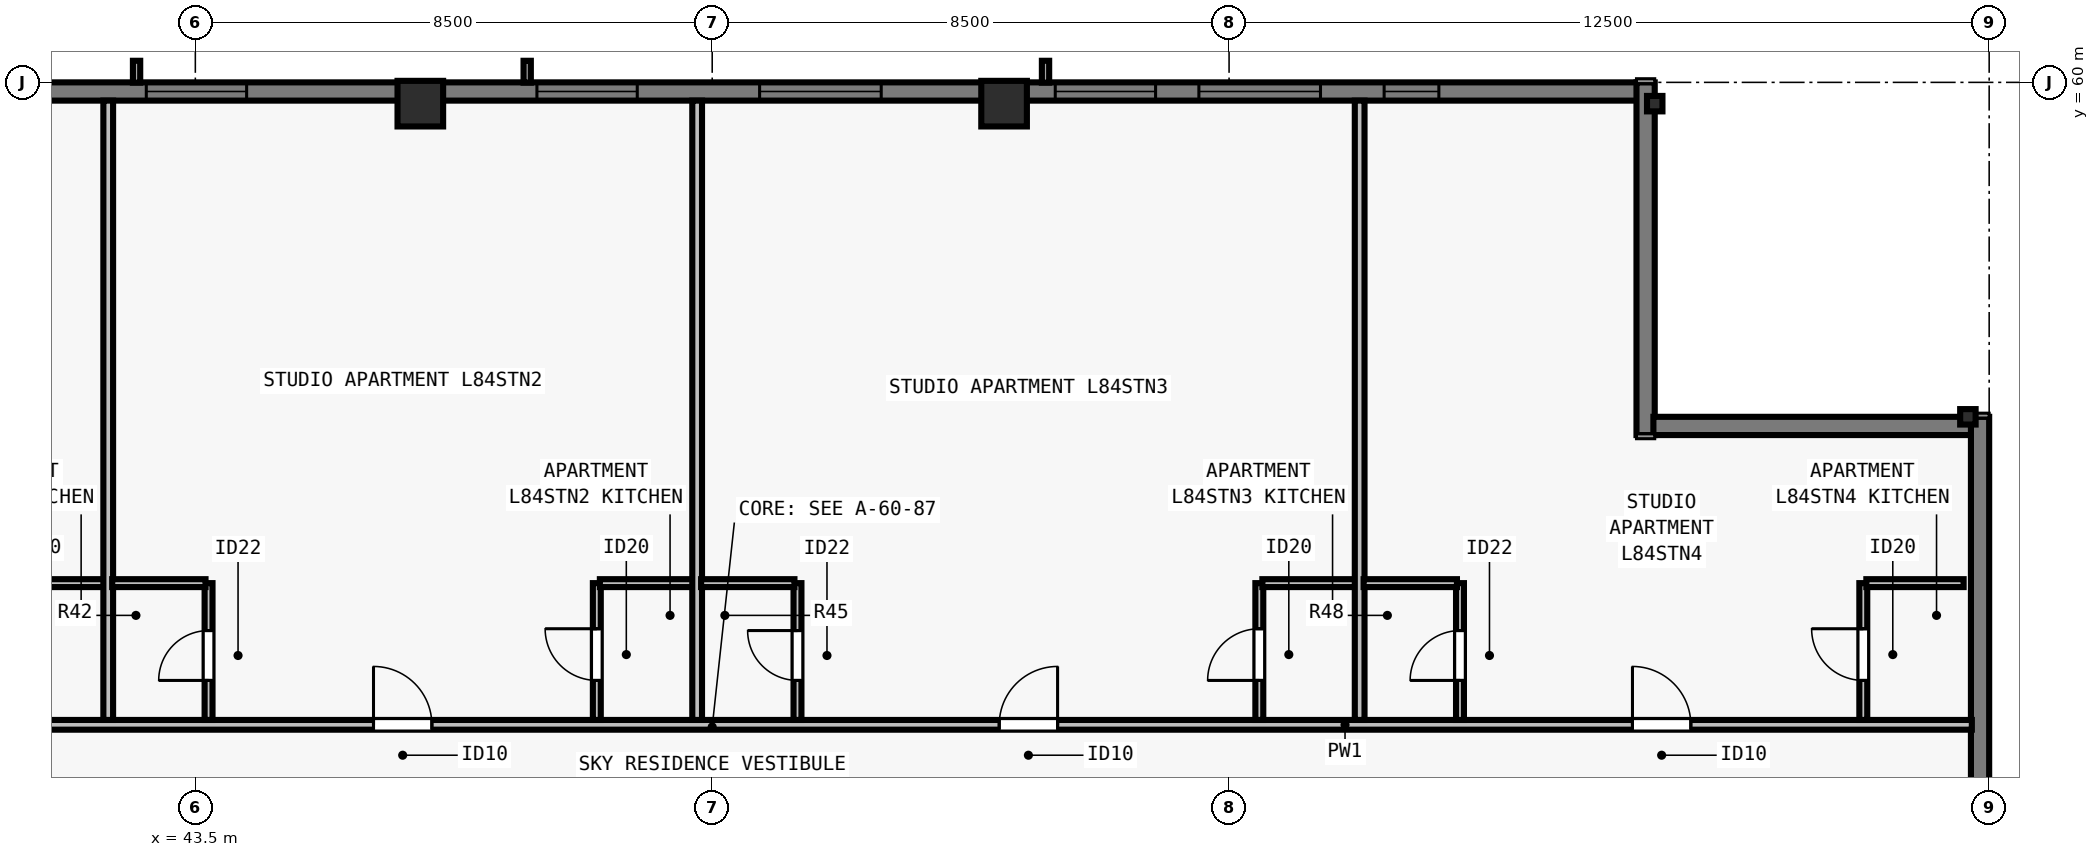
"""IFC4 building model, lengths in metres.
Left out: names, types, materials, properties, quantities, classifications, styles, units other than length and angle.
Written with IfcOpenShell. Run it as: python <this file> out.ifc"""

import sys

from ifc_helpers import new_model, si_unit, direction, frame, frame_2d, origin, origin_2d, place, context, subcontext, project, spatial, rectangle, i_section, extrude, element, fill, save


model = new_model("IFC4")
c1 = context("Model", 3, precision=1e-05, world=origin(), true_north=direction((0.0, 1.0)))
c2 = subcontext(c1, "Body", "Model", "MODEL_VIEW")
j1 = project(units=[si_unit("LENGTHUNIT", "METRE"), si_unit("PLANEANGLEUNIT", "RADIAN")], contexts=[c1])
p1 = place(None, origin())
s1 = spatial("IfcSite", under=j1, at=p1, CompositionType="ELEMENT")
p2 = place(p1, origin())
s2 = spatial("IfcBuilding", under=s1, at=p2, CompositionType="ELEMENT")
p3 = place(p2, frame((0.0, 0.0, 305.0)))
s3 = spatial("IfcBuildingStorey", under=s2, at=p3, CompositionType="ELEMENT", Elevation=305.0)
for number, where, z_axis, x_axis in (
    (1, (72.65, 54.5, 0.0), (0.0, 0.0, 1.0), (0.0, 1.0, 0.0)),
    (2, (67.5, 59.65, 0.0), (0.0, 0.0, 1.0), (1.0, 0.0, 0.0)),
):
    element("IfcColumn", number, at=place(p3, frame(where, z_axis=z_axis, x_axis=x_axis)), inside=s3, PredefinedType="COLUMN", context=c2, shape_type="SweptSolid", body=[
        extrude(i_section(OverallWidth=0.254, OverallDepth=0.254, WebThickness=0.009, FlangeThickness=0.014, FilletRadius=0.013, at=origin_2d()), origin(), (0.0, 0.0, 1.0), 3.5),
    ])
for number, where, z_axis, x_axis in (
    (3, (56.8, 59.65, 0.0), (0.0, 0.0, 1.0), (1.0, 0.0, 0.0)),
    (4, (47.2, 59.65, 0.0), (0.0, 0.0, 1.0), (1.0, 0.0, 0.0)),
):
    element("IfcColumn", number, at=place(p3, frame(where, z_axis=z_axis, x_axis=x_axis)), inside=s3, PredefinedType="COLUMN", context=c2, shape_type="SweptSolid", body=[
        extrude(rectangle(XDim=0.75, YDim=0.75, at=origin_2d()), origin(), (0.0, 0.0, 1.0), 3.5),
    ])
p4 = place(p3, frame((36.5, 59.85, 0.0), z_axis=(0.0, 0.0, 1.0), x_axis=(1.0, 0.0, 0.0)))
e5 = element("IfcWall", 5, at=p4, inside=s3, PredefinedType="SOLIDWALL", context=c2, shape_type="SweptSolid", body=[
    extrude(rectangle(XDim=30.722, YDim=0.3, at=frame_2d((15.361, 0.0))), origin(), (0.0, 0.0, 1.0), 3.29),
])
p5 = place(p4, frame((6.194, 0.0, 0.8)))
e6 = element("IfcOpeningElement", 6, at=p5, cuts=e5, PredefinedType="OPENING", context=c2, shape_type="SweptSolid", body=[
    extrude(rectangle(XDim=1.65, YDim=1.758, at=frame_2d((0.825, 0.879))), frame((0.0, 0.16, 0.0), z_axis=(0.0, -1.0, 0.0), x_axis=(1.0, 0.0, 0.0)), (0.0, 0.0, 1.0), 0.32),
])
p6 = place(p4, frame((12.617, 0.0, 0.8)))
e7 = element("IfcOpeningElement", 7, at=p6, cuts=e5, PredefinedType="OPENING", context=c2, shape_type="SweptSolid", body=[
    extrude(rectangle(XDim=1.65, YDim=1.758, at=frame_2d((0.825, 0.879))), frame((0.0, 0.16, 0.0), z_axis=(0.0, -1.0, 0.0), x_axis=(1.0, 0.0, 0.0)), (0.0, 0.0, 1.0), 0.32),
])
p7 = place(p4, frame((16.28, 0.0, 0.8)))
e8 = element("IfcOpeningElement", 8, at=p7, cuts=e5, PredefinedType="OPENING", context=c2, shape_type="SweptSolid", body=[
    extrude(rectangle(XDim=2.0, YDim=1.758, at=frame_2d((1.0, 0.879))), frame((0.0, 0.16, 0.0), z_axis=(0.0, -1.0, 0.0), x_axis=(1.0, 0.0, 0.0)), (0.0, 0.0, 1.0), 0.32),
])
p8 = place(p4, frame((21.142, 0.0, 0.8)))
e9 = element("IfcOpeningElement", 9, at=p8, cuts=e5, PredefinedType="OPENING", context=c2, shape_type="SweptSolid", body=[
    extrude(rectangle(XDim=1.65, YDim=1.758, at=frame_2d((0.825, 0.879))), frame((0.0, 0.16, 0.0), z_axis=(0.0, -1.0, 0.0), x_axis=(1.0, 0.0, 0.0)), (0.0, 0.0, 1.0), 0.32),
])
p9 = place(p4, frame((23.503, 0.0, 0.8)))
e10 = element("IfcOpeningElement", 10, at=p9, cuts=e5, PredefinedType="OPENING", context=c2, shape_type="SweptSolid", body=[
    extrude(rectangle(XDim=2.0, YDim=1.758, at=frame_2d((1.0, 0.879))), frame((0.0, 0.16, 0.0), z_axis=(0.0, -1.0, 0.0), x_axis=(1.0, 0.0, 0.0)), (0.0, 0.0, 1.0), 0.32),
])
p10 = place(p4, frame((26.55, 0.0, 0.8)))
e11 = element("IfcOpeningElement", 11, at=p10, cuts=e5, PredefinedType="OPENING", context=c2, shape_type="SweptSolid", body=[
    extrude(rectangle(XDim=0.9, YDim=1.75, at=frame_2d((0.45, 0.875))), frame((0.0, 0.16, 0.0), z_axis=(0.0, -1.0, 0.0), x_axis=(1.0, 0.0, 0.0)), (0.0, 0.0, 1.0), 0.32),
])
p11 = place(p3, frame((67.35, 60.0, 0.0), z_axis=(0.0, 0.0, 1.0), x_axis=(0.0, -1.0, 0.0)))
e12 = element("IfcWall", 12, at=p11, inside=s3, PredefinedType="SOLIDWALL", context=c2, shape_type="SweptSolid", body=[
    extrude(rectangle(XDim=5.8, YDim=0.3, at=frame_2d((2.9, 0.0))), origin(), (0.0, 0.0, 1.0), 3.29),
])
p12 = place(p3, frame((67.478, 54.35, 0.0), z_axis=(0.0, 0.0, 1.0), x_axis=(1.0, 0.0, 0.0)))
e13 = element("IfcWall", 13, at=p12, inside=s3, PredefinedType="SOLIDWALL", context=c2, shape_type="SweptSolid", body=[
    extrude(rectangle(XDim=5.244, YDim=0.3, at=frame_2d((2.622, 0.0))), origin(), (0.0, 0.0, 1.0), 3.29),
])
p13 = place(p3, frame((72.85, 54.5, 0.0), z_axis=(0.0, 0.0, 1.0), x_axis=(0.0, -1.0, 0.0)))
e14 = element("IfcWall", 14, at=p13, inside=s3, PredefinedType="SOLIDWALL", context=c2, shape_type="SweptSolid", body=[
    extrude(rectangle(XDim=11.822, YDim=0.3, at=frame_2d((5.911, 0.0))), origin(), (0.0, 0.0, 1.0), 3.29),
])
p14 = place(p13, frame((7.892, 0.0, 0.8)))
e15 = element("IfcOpeningElement", 15, at=p14, cuts=e14, PredefinedType="OPENING", context=c2, shape_type="SweptSolid", body=[
    extrude(rectangle(XDim=2.0, YDim=1.758, at=frame_2d((1.0, 0.879))), frame((0.0, 0.16, 0.0), z_axis=(0.0, -1.0, 0.0), x_axis=(1.0, 0.0, 0.0)), (0.0, 0.0, 1.0), 0.32),
])
p15 = place(p3, frame((31.285, 49.435, 0.0), z_axis=(0.0, 0.0, 1.0), x_axis=(1.0, 0.0, 0.0)))
e16 = element("IfcWall", 16, at=p15, inside=s3, PredefinedType="PARTITIONING", context=c2, shape_type="SweptSolid", body=[
    extrude(rectangle(XDim=41.43, YDim=0.16, at=frame_2d((20.715, 0.0))), origin(), (0.0, 0.0, 1.0), 3.009),
])
p16 = place(p15, frame((4.979, 0.0, 0.0)))
e17 = element("IfcOpeningElement", 17, at=p16, cuts=e16, PredefinedType="OPENING", context=c2, shape_type="SweptSolid", body=[
    extrude(rectangle(XDim=0.96, YDim=2.18, at=frame_2d((0.48, 1.09))), frame((0.0, 0.09, 0.0), z_axis=(0.0, -1.0, 0.0), x_axis=(1.0, 0.0, 0.0)), (0.0, 0.0, 1.0), 0.18),
])
p17 = place(p15, frame((15.145, 0.0, 0.0)))
e18 = element("IfcOpeningElement", 18, at=p17, cuts=e16, PredefinedType="OPENING", context=c2, shape_type="SweptSolid", body=[
    extrude(rectangle(XDim=0.96, YDim=2.18, at=frame_2d((0.48, 1.09))), frame((0.0, 0.09, 0.0), z_axis=(0.0, -1.0, 0.0), x_axis=(1.0, 0.0, 0.0)), (0.0, 0.0, 1.0), 0.18),
])
p18 = place(p15, frame((25.435, 0.0, 0.0)))
e19 = element("IfcOpeningElement", 19, at=p18, cuts=e16, PredefinedType="OPENING", context=c2, shape_type="SweptSolid", body=[
    extrude(rectangle(XDim=0.96, YDim=2.18, at=frame_2d((0.48, 1.09))), frame((0.0, 0.09, 0.0), z_axis=(0.0, -1.0, 0.0), x_axis=(1.0, 0.0, 0.0)), (0.0, 0.0, 1.0), 0.18),
])
p19 = place(p15, frame((35.849, 0.0, 0.0)))
e20 = element("IfcOpeningElement", 20, at=p19, cuts=e16, PredefinedType="OPENING", context=c2, shape_type="SweptSolid", body=[
    extrude(rectangle(XDim=0.96, YDim=2.18, at=frame_2d((0.48, 1.09))), frame((0.0, 0.09, 0.0), z_axis=(0.0, -1.0, 0.0), x_axis=(1.0, 0.0, 0.0)), (0.0, 0.0, 1.0), 0.18),
])
p20 = place(p3, frame((40.468, 51.765, 0.0), z_axis=(0.0, 0.0, 1.0), x_axis=(1.0, 0.0, 0.0)))
e21 = element("IfcWall", 21, at=p20, inside=s3, PredefinedType="PLUMBINGWALL", context=c2, shape_type="SweptSolid", body=[
    extrude(rectangle(XDim=1.6, YDim=0.13, at=frame_2d((0.8, 0.0))), origin(), (0.0, 0.0, 1.0), 3.29),
])
p21 = place(p3, frame((42.067, 49.515, 0.0), z_axis=(0.0, 0.0, 1.0), x_axis=(0.0, 1.0, 0.0)))
e22 = element("IfcWall", 22, at=p21, inside=s3, PredefinedType="PARTITIONING", context=c2, shape_type="SweptSolid", body=[
    extrude(rectangle(XDim=10.185, YDim=0.16, at=frame_2d((5.093, 0.0))), origin(), (0.0, 0.0, 1.0), 2.653),
])
p22 = place(p3, frame((43.718, 49.515, 0.0), z_axis=(0.0, 0.0, 1.0), x_axis=(0.0, 1.0, 0.0)))
e23 = element("IfcWall", 23, at=p22, inside=s3, PredefinedType="PLUMBINGWALL", context=c2, shape_type="SweptSolid", body=[
    extrude(rectangle(XDim=2.25, YDim=0.13, at=frame_2d((1.125, 0.0))), origin(), (0.0, 0.0, 1.0), 3.29),
])
p23 = place(p22, frame((0.65, 0.0, 0.0)))
e24 = element("IfcOpeningElement", 24, at=p23, cuts=e23, PredefinedType="OPENING", context=c2, shape_type="SweptSolid", body=[
    extrude(rectangle(XDim=0.82, YDim=2.1, at=frame_2d((0.41, 1.05))), frame((0.0, 0.075, 0.0), z_axis=(0.0, -1.0, 0.0), x_axis=(1.0, 0.0, 0.0)), (0.0, 0.0, 1.0), 0.15),
])
p24 = place(p3, frame((42.133, 51.765, 0.0), z_axis=(0.0, 0.0, 1.0), x_axis=(1.0, 0.0, 0.0)))
e25 = element("IfcWall", 25, at=p24, inside=s3, PredefinedType="PLUMBINGWALL", context=c2, shape_type="SweptSolid", body=[
    extrude(rectangle(XDim=1.535, YDim=0.13, at=frame_2d((0.768, 0.0))), origin(), (0.0, 0.0, 1.0), 3.29),
])
p25 = place(p3, frame((50.103, 49.515, 0.0), z_axis=(0.0, 0.0, 1.0), x_axis=(0.0, 1.0, 0.0)))
e26 = element("IfcWall", 26, at=p25, inside=s3, PredefinedType="PLUMBINGWALL", context=c2, shape_type="SweptSolid", body=[
    extrude(rectangle(XDim=2.25, YDim=0.13, at=frame_2d((1.125, 0.0))), origin(), (0.0, 0.0, 1.0), 3.009),
])
p26 = place(p25, frame((0.65, 0.0, 0.0)))
e27 = element("IfcOpeningElement", 27, at=p26, cuts=e26, PredefinedType="OPENING", context=c2, shape_type="SweptSolid", body=[
    extrude(rectangle(XDim=0.85, YDim=2.1, at=frame_2d((0.425, 1.05))), frame((0.0, 0.075, 0.0), z_axis=(0.0, -1.0, 0.0), x_axis=(1.0, 0.0, 0.0)), (0.0, 0.0, 1.0), 0.15),
])
p27 = place(p3, frame((50.153, 51.765, 0.0), z_axis=(0.0, 0.0, 1.0), x_axis=(1.0, 0.0, 0.0)))
e28 = element("IfcWall", 28, at=p27, inside=s3, PredefinedType="PLUMBINGWALL", context=c2, shape_type="SweptSolid", body=[
    extrude(rectangle(XDim=1.6, YDim=0.13, at=frame_2d((0.8, 0.0))), origin(), (0.0, 0.0, 1.0), 3.29),
])
p28 = place(p3, frame((51.752, 49.515, 0.0), z_axis=(0.0, 0.0, 1.0), x_axis=(0.0, 1.0, 0.0)))
e29 = element("IfcWall", 29, at=p28, inside=s3, PredefinedType="PARTITIONING", context=c2, shape_type="SweptSolid", body=[
    extrude(rectangle(XDim=10.185, YDim=0.16, at=frame_2d((5.093, 0.0))), origin(), (0.0, 0.0, 1.0), 3.009),
])
p29 = place(p3, frame((53.403, 49.515, 0.0), z_axis=(0.0, 0.0, 1.0), x_axis=(0.0, 1.0, 0.0)))
e30 = element("IfcWall", 30, at=p29, inside=s3, PredefinedType="PLUMBINGWALL", context=c2, shape_type="SweptSolid", body=[
    extrude(rectangle(XDim=2.25, YDim=0.13, at=frame_2d((1.125, 0.0))), origin(), (0.0, 0.0, 1.0), 3.29),
])
p30 = place(p29, frame((0.65, 0.0, 0.0)))
e31 = element("IfcOpeningElement", 31, at=p30, cuts=e30, PredefinedType="OPENING", context=c2, shape_type="SweptSolid", body=[
    extrude(rectangle(XDim=0.82, YDim=2.1, at=frame_2d((0.41, 1.05))), frame((0.0, 0.075, 0.0), z_axis=(0.0, -1.0, 0.0), x_axis=(1.0, 0.0, 0.0)), (0.0, 0.0, 1.0), 0.15),
])
p31 = place(p3, frame((51.817, 51.765, 0.0), z_axis=(0.0, 0.0, 1.0), x_axis=(1.0, 0.0, 0.0)))
e32 = element("IfcWall", 32, at=p31, inside=s3, PredefinedType="PLUMBINGWALL", context=c2, shape_type="SweptSolid", body=[
    extrude(rectangle(XDim=1.535, YDim=0.13, at=frame_2d((0.768, 0.0))), origin(), (0.0, 0.0, 1.0), 3.29),
])
p32 = place(p3, frame((60.998, 49.515, 0.0), z_axis=(0.0, 0.0, 1.0), x_axis=(0.0, 1.0, 0.0)))
e33 = element("IfcWall", 33, at=p32, inside=s3, PredefinedType="PLUMBINGWALL", context=c2, shape_type="SweptSolid", body=[
    extrude(rectangle(XDim=2.25, YDim=0.13, at=frame_2d((1.125, 0.0))), origin(), (0.0, 0.0, 1.0), 3.29),
])
p33 = place(p32, frame((0.65, 0.0, 0.0)))
e34 = element("IfcOpeningElement", 34, at=p33, cuts=e33, PredefinedType="OPENING", context=c2, shape_type="SweptSolid", body=[
    extrude(rectangle(XDim=0.85, YDim=2.1, at=frame_2d((0.425, 1.05))), frame((0.0, 0.075, 0.0), z_axis=(0.0, -1.0, 0.0), x_axis=(1.0, 0.0, 0.0)), (0.0, 0.0, 1.0), 0.15),
])
p34 = place(p3, frame((61.048, 51.765, 0.0), z_axis=(0.0, 0.0, 1.0), x_axis=(1.0, 0.0, 0.0)))
e35 = element("IfcWall", 35, at=p34, inside=s3, PredefinedType="PLUMBINGWALL", context=c2, shape_type="SweptSolid", body=[
    extrude(rectangle(XDim=1.6, YDim=0.13, at=frame_2d((0.8, 0.0))), origin(), (0.0, 0.0, 1.0), 3.29),
])
p35 = place(p3, frame((62.647, 49.515, 0.0), z_axis=(0.0, 0.0, 1.0), x_axis=(0.0, 1.0, 0.0)))
e36 = element("IfcWall", 36, at=p35, inside=s3, PredefinedType="PARTITIONING", context=c2, shape_type="SweptSolid", body=[
    extrude(rectangle(XDim=10.185, YDim=0.16, at=frame_2d((5.093, 0.0))), origin(), (0.0, 0.0, 1.0), 2.653),
])
p36 = place(p3, frame((64.298, 49.515, 0.0), z_axis=(0.0, 0.0, 1.0), x_axis=(0.0, 1.0, 0.0)))
e37 = element("IfcWall", 37, at=p36, inside=s3, PredefinedType="PLUMBINGWALL", context=c2, shape_type="SweptSolid", body=[
    extrude(rectangle(XDim=2.25, YDim=0.13, at=frame_2d((1.125, 0.0))), origin(), (0.0, 0.0, 1.0), 3.29),
])
p37 = place(p36, frame((0.65, 0.0, 0.0)))
e38 = element("IfcOpeningElement", 38, at=p37, cuts=e37, PredefinedType="OPENING", context=c2, shape_type="SweptSolid", body=[
    extrude(rectangle(XDim=0.82, YDim=2.1, at=frame_2d((0.41, 1.05))), frame((0.0, 0.075, 0.0), z_axis=(0.0, -1.0, 0.0), x_axis=(1.0, 0.0, 0.0)), (0.0, 0.0, 1.0), 0.15),
])
p38 = place(p3, frame((62.712, 51.765, 0.0), z_axis=(0.0, 0.0, 1.0), x_axis=(1.0, 0.0, 0.0)))
e39 = element("IfcWall", 39, at=p38, inside=s3, PredefinedType="PLUMBINGWALL", context=c2, shape_type="SweptSolid", body=[
    extrude(rectangle(XDim=1.535, YDim=0.13, at=frame_2d((0.768, 0.0))), origin(), (0.0, 0.0, 1.0), 3.29),
])
p39 = place(p3, frame((70.93, 49.515, 0.0), z_axis=(0.0, 0.0, 1.0), x_axis=(0.0, 1.0, 0.0)))
e40 = element("IfcWall", 40, at=p39, inside=s3, PredefinedType="PLUMBINGWALL", context=c2, shape_type="SweptSolid", body=[
    extrude(rectangle(XDim=2.25, YDim=0.13, at=frame_2d((1.125, 0.0))), origin(), (0.0, 0.0, 1.0), 3.29),
])
p40 = place(p39, frame((0.65, 0.0, 0.0)))
e41 = element("IfcOpeningElement", 41, at=p40, cuts=e40, PredefinedType="OPENING", context=c2, shape_type="SweptSolid", body=[
    extrude(rectangle(XDim=0.85, YDim=2.1, at=frame_2d((0.425, 1.05))), frame((0.0, 0.075, 0.0), z_axis=(0.0, -1.0, 0.0), x_axis=(1.0, 0.0, 0.0)), (0.0, 0.0, 1.0), 0.15),
])
p41 = place(p3, frame((70.98, 51.765, 0.0), z_axis=(0.0, 0.0, 1.0), x_axis=(1.0, 0.0, 0.0)))
e42 = element("IfcWall", 42, at=p41, inside=s3, PredefinedType="PLUMBINGWALL", context=c2, shape_type="SweptSolid", body=[
    extrude(rectangle(XDim=1.6, YDim=0.13, at=frame_2d((0.8, 0.0))), origin(), (0.0, 0.0, 1.0), 3.29),
])
p42 = place(p5, origin())
e43 = element("IfcWindow", 43, at=p42, inside=s3, PartitioningType="SINGLE_PANEL", PredefinedType="WINDOW", context=c2, shape_type="SweptSolid", body=[
    extrude(rectangle(XDim=1.65, YDim=1.758, at=frame_2d((0.825, 0.879))), frame((0.0, -0.05, 0.0), z_axis=(0.0, -1.0, 0.0), x_axis=(1.0, 0.0, 0.0)), (0.0, 0.0, 1.0), 0.06),
])
fill(e6, e43)
p43 = place(p6, origin())
e44 = element("IfcWindow", 44, at=p43, inside=s3, PartitioningType="SINGLE_PANEL", PredefinedType="WINDOW", context=c2, shape_type="SweptSolid", body=[
    extrude(rectangle(XDim=1.65, YDim=1.758, at=frame_2d((0.825, 0.879))), frame((0.0, -0.05, 0.0), z_axis=(0.0, -1.0, 0.0), x_axis=(1.0, 0.0, 0.0)), (0.0, 0.0, 1.0), 0.06),
])
fill(e7, e44)
p44 = place(p7, origin())
e45 = element("IfcWindow", 45, at=p44, inside=s3, PartitioningType="SINGLE_PANEL", PredefinedType="WINDOW", context=c2, shape_type="SweptSolid", body=[
    extrude(rectangle(XDim=2.0, YDim=1.758, at=frame_2d((1.0, 0.879))), frame((0.0, -0.05, 0.0), z_axis=(0.0, -1.0, 0.0), x_axis=(1.0, 0.0, 0.0)), (0.0, 0.0, 1.0), 0.06),
])
fill(e8, e45)
p45 = place(p8, origin())
e46 = element("IfcWindow", 46, at=p45, inside=s3, PartitioningType="SINGLE_PANEL", PredefinedType="WINDOW", context=c2, shape_type="SweptSolid", body=[
    extrude(rectangle(XDim=1.65, YDim=1.758, at=frame_2d((0.825, 0.879))), frame((0.0, -0.05, 0.0), z_axis=(0.0, -1.0, 0.0), x_axis=(1.0, 0.0, 0.0)), (0.0, 0.0, 1.0), 0.06),
])
fill(e9, e46)
p46 = place(p9, origin())
e47 = element("IfcWindow", 47, at=p46, inside=s3, PartitioningType="SINGLE_PANEL", PredefinedType="WINDOW", context=c2, shape_type="SweptSolid", body=[
    extrude(rectangle(XDim=2.0, YDim=1.758, at=frame_2d((1.0, 0.879))), frame((0.0, -0.05, 0.0), z_axis=(0.0, -1.0, 0.0), x_axis=(1.0, 0.0, 0.0)), (0.0, 0.0, 1.0), 0.06),
])
fill(e10, e47)
p47 = place(p10, origin())
e48 = element("IfcWindow", 48, at=p47, inside=s3, PartitioningType="SINGLE_PANEL", PredefinedType="WINDOW", context=c2, shape_type="SweptSolid", body=[
    extrude(rectangle(XDim=0.9, YDim=1.75, at=frame_2d((0.45, 0.875))), frame((0.0, -0.04, 0.0), z_axis=(0.0, -1.0, 0.0), x_axis=(1.0, 0.0, 0.0)), (0.0, 0.0, 1.0), 0.06),
])
fill(e11, e48)
p48 = place(p23, origin())
e49 = element("IfcDoor", 49, at=p48, inside=s3, OperationType="SINGLE_SWING_LEFT", PredefinedType="DOOR", context=c2, shape_type="SweptSolid", body=[
    extrude(rectangle(XDim=0.82, YDim=2.1, at=frame_2d((0.41, 1.05))), frame((0.0, 0.025, 0.0), z_axis=(0.0, -1.0, 0.0), x_axis=(1.0, 0.0, 0.0)), (0.0, 0.0, 1.0), 0.05),
])
fill(e24, e49)
p49 = place(p26, origin())
e50 = element("IfcDoor", 50, at=p49, inside=s3, OperationType="SINGLE_SWING_RIGHT", PredefinedType="DOOR", context=c2, shape_type="SweptSolid", body=[
    extrude(rectangle(XDim=0.85, YDim=2.1, at=frame_2d((0.425, 1.05))), frame((0.0, 0.025, 0.0), z_axis=(0.0, -1.0, 0.0), x_axis=(1.0, 0.0, 0.0)), (0.0, 0.0, 1.0), 0.05),
])
fill(e27, e50)
p50 = place(p17, origin())
e51 = element("IfcDoor", 51, at=p50, inside=s3, OperationType="SINGLE_SWING_LEFT", PredefinedType="DOOR", context=c2, shape_type="SweptSolid", body=[
    extrude(rectangle(XDim=0.96, YDim=2.18, at=frame_2d((0.48, 1.09))), frame((0.0, 0.025, 0.0), z_axis=(0.0, -1.0, 0.0), x_axis=(1.0, 0.0, 0.0)), (0.0, 0.0, 1.0), 0.05),
])
fill(e18, e51)
p51 = place(p30, origin())
e52 = element("IfcDoor", 52, at=p51, inside=s3, OperationType="SINGLE_SWING_RIGHT", PredefinedType="DOOR", context=c2, shape_type="SweptSolid", body=[
    extrude(rectangle(XDim=0.82, YDim=2.1, at=frame_2d((0.41, 1.05))), frame((0.0, 0.025, 0.0), z_axis=(0.0, -1.0, 0.0), x_axis=(1.0, 0.0, 0.0)), (0.0, 0.0, 1.0), 0.05),
])
fill(e31, e52)
p52 = place(p33, origin())
e53 = element("IfcDoor", 53, at=p52, inside=s3, OperationType="SINGLE_SWING_LEFT", PredefinedType="DOOR", context=c2, shape_type="SweptSolid", body=[
    extrude(rectangle(XDim=0.85, YDim=2.1, at=frame_2d((0.425, 1.05))), frame((0.0, 0.025, 0.0), z_axis=(0.0, -1.0, 0.0), x_axis=(1.0, 0.0, 0.0)), (0.0, 0.0, 1.0), 0.05),
])
fill(e34, e53)
p53 = place(p18, origin())
e54 = element("IfcDoor", 54, at=p53, inside=s3, OperationType="SINGLE_SWING_RIGHT", PredefinedType="DOOR", context=c2, shape_type="SweptSolid", body=[
    extrude(rectangle(XDim=0.96, YDim=2.18, at=frame_2d((0.48, 1.09))), frame((0.0, 0.025, 0.0), z_axis=(0.0, -1.0, 0.0), x_axis=(1.0, 0.0, 0.0)), (0.0, 0.0, 1.0), 0.05),
])
fill(e19, e54)
p54 = place(p37, origin())
e55 = element("IfcDoor", 55, at=p54, inside=s3, OperationType="SINGLE_SWING_LEFT", PredefinedType="DOOR", context=c2, shape_type="SweptSolid", body=[
    extrude(rectangle(XDim=0.82, YDim=2.1, at=frame_2d((0.41, 1.05))), frame((0.0, 0.025, 0.0), z_axis=(0.0, -1.0, 0.0), x_axis=(1.0, 0.0, 0.0)), (0.0, 0.0, 1.0), 0.05),
])
fill(e38, e55)
p55 = place(p40, origin())
e56 = element("IfcDoor", 56, at=p55, inside=s3, OperationType="SINGLE_SWING_RIGHT", PredefinedType="DOOR", context=c2, shape_type="SweptSolid", body=[
    extrude(rectangle(XDim=0.85, YDim=2.1, at=frame_2d((0.425, 1.05))), frame((0.0, 0.025, 0.0), z_axis=(0.0, -1.0, 0.0), x_axis=(1.0, 0.0, 0.0)), (0.0, 0.0, 1.0), 0.05),
])
fill(e41, e56)
p56 = place(p19, origin())
e57 = element("IfcDoor", 57, at=p56, inside=s3, OperationType="SINGLE_SWING_LEFT", PredefinedType="DOOR", context=c2, shape_type="SweptSolid", body=[
    extrude(rectangle(XDim=0.96, YDim=2.18, at=frame_2d((0.48, 1.09))), frame((0.0, 0.025, 0.0), z_axis=(0.0, -1.0, 0.0), x_axis=(1.0, 0.0, 0.0)), (0.0, 0.0, 1.0), 0.05),
])
fill(e20, e57)
save(model, sys.argv[1])
